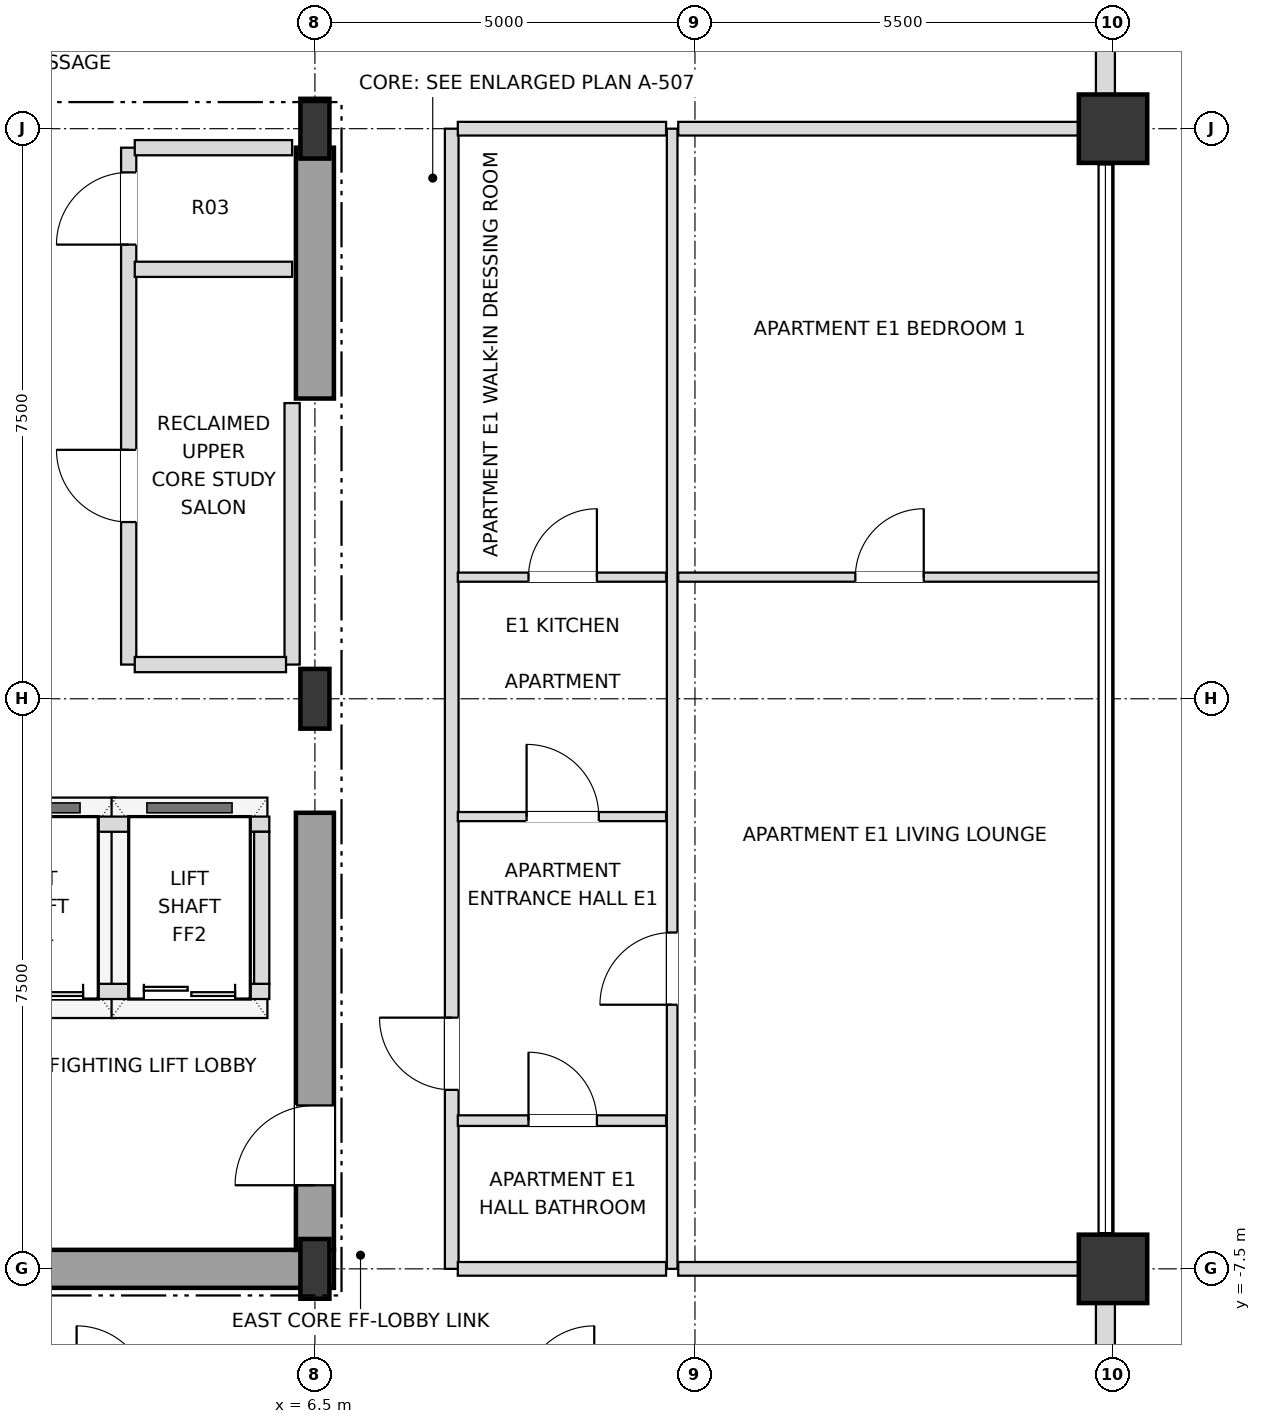
"""IFC4 building model, lengths in metres.
Left out: names, types, materials, properties, quantities, classifications, styles, units other than length and angle.
Written with IfcOpenShell. Run it as: python <this file> out.ifc"""

import sys

from ifc_helpers import new_model, si_unit, direction, frame, frame_2d, origin, origin_2d, place, context, subcontext, project, spatial, rectangle, i_section, extrude, element, fill, save


model = new_model("IFC4")
c1 = context("Model", 3, precision=1e-05, world=origin(), true_north=direction((0.0, 1.0)))
c2 = subcontext(c1, "Body", "Model", "MODEL_VIEW")
j1 = project(units=[si_unit("LENGTHUNIT", "METRE"), si_unit("PLANEANGLEUNIT", "RADIAN")], contexts=[c1])
p1 = place(None, origin())
s1 = spatial("IfcSite", under=j1, at=p1, CompositionType="ELEMENT")
p2 = place(p1, origin())
s2 = spatial("IfcBuilding", under=s1, at=p2, CompositionType="ELEMENT")
p3 = place(p2, frame((0.0, 0.0, 247.5)))
s3 = spatial("IfcBuildingStorey", under=s2, at=p3, CompositionType="ELEMENT", Elevation=247.5)
for number, where, z_axis, x_axis in (
    (1, (6.5, -7.5, 0.0), (0.0, 0.0, 1.0), (1.0, 0.0, 0.0)),
    (2, (6.5, 0.0, 0.0), (0.0, 0.0, 1.0), (1.0, 0.0, 0.0)),
    (3, (6.5, 7.5, 0.0), (0.0, 0.0, 1.0), (1.0, 0.0, 0.0)),
):
    element("IfcColumn", number, at=place(p3, frame(where, z_axis=z_axis, x_axis=x_axis)), inside=s3, PredefinedType="COLUMN", context=c2, shape_type="SweptSolid", body=[
        extrude(i_section(OverallWidth=0.382, OverallDepth=0.786, WebThickness=0.02, FlangeThickness=0.033, at=origin_2d()), origin(), (0.0, 0.0, 1.0), 3.6),
    ])
for number, where, z_axis, x_axis in (
    (4, (17.0, -7.5, 0.0), (0.0, 0.0, 1.0), (1.0, 0.0, 0.0)),
    (5, (17.0, 7.5, 0.0), (0.0, 0.0, 1.0), (1.0, 0.0, 0.0)),
):
    element("IfcColumn", number, at=place(p3, frame(where, z_axis=z_axis, x_axis=x_axis)), inside=s3, PredefinedType="USERDEFINED", context=c2, shape_type="SweptSolid", body=[
        extrude(rectangle(XDim=0.9, YDim=0.9, at=origin_2d()), origin(), (0.0, 0.0, 1.0), 3.6),
    ])
p4 = place(p3, frame((16.9, -12.555, 0.0), z_axis=(0.0, 0.0, 1.0), x_axis=(0.0, 1.0, 0.0)))
e6 = element("IfcWall", 6, at=p4, inside=s3, PredefinedType="SOLIDWALL", context=c2, shape_type="SweptSolid", body=[
    extrude(rectangle(XDim=4.61, YDim=0.25, at=frame_2d((2.305, 0.0))), origin(), (0.0, 0.0, 1.0), 2.748),
])
p5 = place(p4, frame((1.405, 0.0, 0.72)))
e7 = element("IfcOpeningElement", 7, at=p5, cuts=e6, PredefinedType="OPENING", context=c2, shape_type="SweptSolid", body=[
    extrude(rectangle(XDim=1.8, YDim=1.68, at=frame_2d((0.9, 0.84))), frame((0.0, 0.135, 0.0), z_axis=(0.0, -1.0, 0.0), x_axis=(1.0, 0.0, 0.0)), (0.0, 0.0, 1.0), 0.27),
])
p6 = place(p3, frame((16.9, 7.945, 0.0), z_axis=(0.0, 0.0, 1.0), x_axis=(0.0, 1.0, 0.0)))
e8 = element("IfcWall", 8, at=p6, inside=s3, PredefinedType="SOLIDWALL", context=c2, shape_type="SweptSolid", body=[
    extrude(rectangle(XDim=4.61, YDim=0.25, at=frame_2d((2.305, 0.0))), origin(), (0.0, 0.0, 1.0), 2.748),
])
p7 = place(p6, frame((1.405, 0.0, 0.72)))
e9 = element("IfcOpeningElement", 9, at=p7, cuts=e8, PredefinedType="OPENING", context=c2, shape_type="SweptSolid", body=[
    extrude(rectangle(XDim=1.8, YDim=1.68, at=frame_2d((0.9, 0.84))), frame((0.0, 0.135, 0.0), z_axis=(0.0, -1.0, 0.0), x_axis=(1.0, 0.0, 0.0)), (0.0, 0.0, 1.0), 0.27),
])
p8 = place(p3, frame((0.0, -7.5, 0.0), z_axis=(0.0, 0.0, 1.0), x_axis=(1.0, 0.0, 0.0)))
e10 = element("IfcWall", 10, at=p8, inside=s3, PredefinedType="SHEAR", context=c2, shape_type="SweptSolid", body=[
    extrude(rectangle(XDim=6.75, YDim=0.5, at=frame_2d((3.375, 0.0))), origin(), (0.0, 0.0, 1.0), 3.38),
])
p9 = place(p3, frame((6.5, -7.25, 0.0), z_axis=(0.0, 0.0, 1.0), x_axis=(0.0, 1.0, 0.0)))
e11 = element("IfcWall", 11, at=p9, inside=s3, PredefinedType="SHEAR", context=c2, shape_type="SweptSolid", body=[
    extrude(rectangle(XDim=5.75, YDim=0.5, at=frame_2d((2.875, 0.0))), origin(), (0.0, 0.0, 1.0), 3.38),
])
p10 = place(p9, frame((0.85, 0.0, 0.0)))
e12 = element("IfcOpeningElement", 12, at=p10, cuts=e11, PredefinedType="OPENING", context=c2, shape_type="SweptSolid", body=[
    extrude(rectangle(XDim=1.05, YDim=2.15, at=frame_2d((0.525, 1.075))), frame((0.0, 0.26, 0.0), z_axis=(0.0, -1.0, 0.0), x_axis=(1.0, 0.0, 0.0)), (0.0, 0.0, 1.0), 0.52),
])
p11 = place(p3, frame((6.5, 3.95, 0.0), z_axis=(0.0, 0.0, 1.0), x_axis=(0.0, 1.0, 0.0)))
e13 = element("IfcWall", 13, at=p11, inside=s3, PredefinedType="SHEAR", context=c2, shape_type="SweptSolid", body=[
    extrude(rectangle(XDim=3.3, YDim=0.5, at=frame_2d((1.65, 0.0))), origin(), (0.0, 0.0, 1.0), 3.38),
])
p12 = place(p3, frame((1.8, -3.85, 0.0), z_axis=(0.0, 0.0, 1.0), x_axis=(1.0, 0.0, 0.0)))
e14 = element("IfcWall", 14, at=p12, inside=s3, PredefinedType="SOLIDWALL", context=c2, shape_type="SweptSolid", body=[
    extrude(rectangle(XDim=4.1, YDim=0.2, at=frame_2d((2.05, 0.0))), origin(), (0.0, 0.0, 1.0), 3.38),
])
p13 = place(p12, frame((0.45, 0.0, 0.0)))
e15 = element("IfcOpeningElement", 15, at=p13, cuts=e14, PredefinedType="OPENING", context=c2, shape_type="SweptSolid", body=[
    extrude(rectangle(XDim=1.2, YDim=2.2, at=frame_2d((0.6, 1.1))), frame((0.0, 0.11, 0.0), z_axis=(0.0, -1.0, 0.0), x_axis=(1.0, 0.0, 0.0)), (0.0, 0.0, 1.0), 0.22),
])
p14 = place(p12, frame((2.45, 0.0, 0.0)))
e16 = element("IfcOpeningElement", 16, at=p14, cuts=e14, PredefinedType="OPENING", context=c2, shape_type="SweptSolid", body=[
    extrude(rectangle(XDim=1.2, YDim=2.2, at=frame_2d((0.6, 1.1))), frame((0.0, 0.11, 0.0), z_axis=(0.0, -1.0, 0.0), x_axis=(1.0, 0.0, 0.0)), (0.0, 0.0, 1.0), 0.22),
])
p15 = place(p3, frame((1.8, -1.65, 0.0), z_axis=(0.0, 0.0, 1.0), x_axis=(1.0, 0.0, 0.0)))
e17 = element("IfcWall", 17, at=p15, inside=s3, PredefinedType="SOLIDWALL", context=c2, shape_type="SweptSolid", body=[
    extrude(rectangle(XDim=4.1, YDim=0.2, at=frame_2d((2.05, 0.0))), origin(), (0.0, 0.0, 1.0), 3.38),
])
p16 = place(p3, frame((5.8, -3.75, 0.0), z_axis=(0.0, 0.0, 1.0), x_axis=(0.0, 1.0, 0.0)))
e18 = element("IfcWall", 18, at=p16, inside=s3, PredefinedType="SOLIDWALL", context=c2, shape_type="SweptSolid", body=[
    extrude(rectangle(XDim=2.0, YDim=0.2, at=frame_2d((1.0, 0.0))), origin(), (0.0, 0.0, 1.0), 3.38),
])
p17 = place(p3, frame((4.05, 0.45, 0.0), z_axis=(0.0, 0.0, 1.0), x_axis=(0.0, 1.0, 0.0)))
e19 = element("IfcWall", 19, at=p17, inside=s3, PredefinedType="SOLIDWALL", context=c2, shape_type="SweptSolid", body=[
    extrude(rectangle(XDim=6.8, YDim=0.2, at=frame_2d((3.4, 0.0))), origin(), (0.0, 0.0, 1.0), 3.38),
])
p18 = place(p17, frame((1.875, 0.0, 0.0)))
e20 = element("IfcOpeningElement", 20, at=p18, cuts=e19, PredefinedType="OPENING", context=c2, shape_type="SweptSolid", body=[
    extrude(rectangle(XDim=0.95, YDim=2.15, at=frame_2d((0.475, 1.075))), frame((0.0, 0.11, 0.0), z_axis=(0.0, -1.0, 0.0), x_axis=(1.0, 0.0, 0.0)), (0.0, 0.0, 1.0), 0.22),
])
p19 = place(p17, frame((5.525, 0.0, 0.0)))
e21 = element("IfcOpeningElement", 21, at=p19, cuts=e19, PredefinedType="OPENING", context=c2, shape_type="SweptSolid", body=[
    extrude(rectangle(XDim=0.95, YDim=2.15, at=frame_2d((0.475, 1.075))), frame((0.0, 0.11, 0.0), z_axis=(0.0, -1.0, 0.0), x_axis=(1.0, 0.0, 0.0)), (0.0, 0.0, 1.0), 0.22),
])
p20 = place(p3, frame((6.2, 0.45, 0.0), z_axis=(0.0, 0.0, 1.0), x_axis=(0.0, 1.0, 0.0)))
e22 = element("IfcWall", 22, at=p20, inside=s3, PredefinedType="SOLIDWALL", context=c2, shape_type="SweptSolid", body=[
    extrude(rectangle(XDim=3.44, YDim=0.2, at=frame_2d((1.72, 0.0))), origin(), (0.0, 0.0, 1.0), 3.38),
])
p21 = place(p3, frame((8.3, -7.5, 0.0), z_axis=(0.0, 0.0, 1.0), x_axis=(0.0, 1.0, 0.0)))
e23 = element("IfcWall", 23, at=p21, inside=s3, PredefinedType="PARTITIONING", context=c2, shape_type="SweptSolid", body=[
    extrude(rectangle(XDim=15.0, YDim=0.18, at=frame_2d((7.5, 0.0))), origin(), (0.0, 0.0, 1.0), 3.38),
])
p22 = place(p21, frame((2.355, 0.0, 0.0)))
e24 = element("IfcOpeningElement", 24, at=p22, cuts=e23, PredefinedType="OPENING", context=c2, shape_type="SweptSolid", body=[
    extrude(rectangle(XDim=0.95, YDim=2.15, at=frame_2d((0.475, 1.075))), frame((0.0, 0.1, 0.0), z_axis=(0.0, -1.0, 0.0), x_axis=(1.0, 0.0, 0.0)), (0.0, 0.0, 1.0), 0.2),
])
p23 = place(p3, frame((11.2, -7.5, 0.0), z_axis=(0.0, 0.0, 1.0), x_axis=(0.0, 1.0, 0.0)))
e25 = element("IfcWall", 25, at=p23, inside=s3, PredefinedType="PARTITIONING", context=c2, shape_type="SweptSolid", body=[
    extrude(rectangle(XDim=15.0, YDim=0.14, at=frame_2d((7.5, 0.0))), origin(), (0.0, 0.0, 1.0), 3.38),
])
p24 = place(p23, frame((3.475, 0.0, 0.0)))
e26 = element("IfcOpeningElement", 26, at=p24, cuts=e25, PredefinedType="OPENING", context=c2, shape_type="SweptSolid", body=[
    extrude(rectangle(XDim=0.95, YDim=2.1, at=frame_2d((0.475, 1.05))), frame((0.0, 0.08, 0.0), z_axis=(0.0, -1.0, 0.0), x_axis=(1.0, 0.0, 0.0)), (0.0, 0.0, 1.0), 0.16),
])
p25 = place(p3, frame((8.38, -7.5, 0.0), z_axis=(0.0, 0.0, 1.0), x_axis=(1.0, 0.0, 0.0)))
e27 = element("IfcWall", 27, at=p25, inside=s3, PredefinedType="PARTITIONING", context=c2, shape_type="SweptSolid", body=[
    extrude(rectangle(XDim=2.74, YDim=0.18, at=frame_2d((1.37, 0.0))), origin(), (0.0, 0.0, 1.0), 2.826),
])
p26 = place(p3, frame((11.28, -7.5, 0.0), z_axis=(0.0, 0.0, 1.0), x_axis=(1.0, 0.0, 0.0)))
e28 = element("IfcWall", 28, at=p26, inside=s3, PredefinedType="PARTITIONING", context=c2, shape_type="SweptSolid", body=[
    extrude(rectangle(XDim=5.62, YDim=0.18, at=frame_2d((2.81, 0.0))), origin(), (0.0, 0.0, 1.0), 2.826),
])
p27 = place(p3, frame((8.38, -5.55, 0.0), z_axis=(0.0, 0.0, 1.0), x_axis=(1.0, 0.0, 0.0)))
e29 = element("IfcWall", 29, at=p27, inside=s3, PredefinedType="PARTITIONING", context=c2, shape_type="SweptSolid", body=[
    extrude(rectangle(XDim=2.74, YDim=0.14, at=frame_2d((1.37, 0.0))), origin(), (0.0, 0.0, 1.0), 3.38),
])
p28 = place(p27, frame((0.93, 0.0, 0.0)))
e30 = element("IfcOpeningElement", 30, at=p28, cuts=e29, PredefinedType="OPENING", context=c2, shape_type="SweptSolid", body=[
    extrude(rectangle(XDim=0.9, YDim=2.1, at=frame_2d((0.45, 1.05))), frame((0.0, 0.08, 0.0), z_axis=(0.0, -1.0, 0.0), x_axis=(1.0, 0.0, 0.0)), (0.0, 0.0, 1.0), 0.16),
])
p29 = place(p3, frame((8.38, -1.55, 0.0), z_axis=(0.0, 0.0, 1.0), x_axis=(1.0, 0.0, 0.0)))
e31 = element("IfcWall", 31, at=p29, inside=s3, PredefinedType="PARTITIONING", context=c2, shape_type="SweptSolid", body=[
    extrude(rectangle(XDim=2.74, YDim=0.12, at=frame_2d((1.37, 0.0))), origin(), (0.0, 0.0, 1.0), 3.38),
])
p30 = place(p29, frame((0.905, 0.0, 0.0)))
e32 = element("IfcOpeningElement", 32, at=p30, cuts=e31, PredefinedType="OPENING", context=c2, shape_type="SweptSolid", body=[
    extrude(rectangle(XDim=0.95, YDim=2.1, at=frame_2d((0.475, 1.05))), frame((0.0, 0.07, 0.0), z_axis=(0.0, -1.0, 0.0), x_axis=(1.0, 0.0, 0.0)), (0.0, 0.0, 1.0), 0.14),
])
p31 = place(p3, frame((4.13, 0.45, 0.0), z_axis=(0.0, 0.0, 1.0), x_axis=(1.0, 0.0, 0.0)))
e33 = element("IfcWall", 33, at=p31, inside=s3, PredefinedType="SOLIDWALL", context=c2, shape_type="SweptSolid", body=[
    extrude(rectangle(XDim=1.99, YDim=0.2, at=frame_2d((0.995, 0.0))), origin(), (0.0, 0.0, 1.0), 3.38),
])
p32 = place(p3, frame((8.38, 1.6, 0.0), z_axis=(0.0, 0.0, 1.0), x_axis=(1.0, 0.0, 0.0)))
e34 = element("IfcWall", 34, at=p32, inside=s3, PredefinedType="PARTITIONING", context=c2, shape_type="SweptSolid", body=[
    extrude(rectangle(XDim=2.74, YDim=0.12, at=frame_2d((1.37, 0.0))), origin(), (0.0, 0.0, 1.0), 3.38),
])
p33 = place(p32, frame((0.93, 0.0, 0.0)))
e35 = element("IfcOpeningElement", 35, at=p33, cuts=e34, PredefinedType="OPENING", context=c2, shape_type="SweptSolid", body=[
    extrude(rectangle(XDim=0.9, YDim=2.1, at=frame_2d((0.45, 1.05))), frame((0.0, 0.07, 0.0), z_axis=(0.0, -1.0, 0.0), x_axis=(1.0, 0.0, 0.0)), (0.0, 0.0, 1.0), 0.14),
])
p34 = place(p3, frame((11.28, 1.6, 0.0), z_axis=(0.0, 0.0, 1.0), x_axis=(1.0, 0.0, 0.0)))
e36 = element("IfcWall", 36, at=p34, inside=s3, PredefinedType="PARTITIONING", context=c2, shape_type="SweptSolid", body=[
    extrude(rectangle(XDim=5.54, YDim=0.12, at=frame_2d((2.77, 0.0))), origin(), (0.0, 0.0, 1.0), 3.018),
])
p35 = place(p34, frame((2.33, 0.0, 0.0)))
e37 = element("IfcOpeningElement", 37, at=p35, cuts=e36, PredefinedType="OPENING", context=c2, shape_type="SweptSolid", body=[
    extrude(rectangle(XDim=0.9, YDim=2.1, at=frame_2d((0.45, 1.05))), frame((0.0, 0.07, 0.0), z_axis=(0.0, -1.0, 0.0), x_axis=(1.0, 0.0, 0.0)), (0.0, 0.0, 1.0), 0.14),
])
for number, where, z_axis, x_axis in (
    (38, (4.13, 5.65, 0.0), (0.0, 0.0, 1.0), (1.0, 0.0, 0.0)),
    (39, (4.13, 7.25, 0.0), (0.0, 0.0, 1.0), (1.0, 0.0, 0.0)),
):
    element("IfcWall", number, at=place(p3, frame(where, z_axis=z_axis, x_axis=x_axis)), inside=s3, PredefinedType="SOLIDWALL", context=c2, shape_type="SweptSolid", body=[
        extrude(rectangle(XDim=2.07, YDim=0.2, at=frame_2d((1.035, 0.0))), origin(), (0.0, 0.0, 1.0), 3.38),
    ])
p36 = place(p3, frame((8.38, 7.5, 0.0), z_axis=(0.0, 0.0, 1.0), x_axis=(1.0, 0.0, 0.0)))
e40 = element("IfcWall", 40, at=p36, inside=s3, PredefinedType="PARTITIONING", context=c2, shape_type="SweptSolid", body=[
    extrude(rectangle(XDim=2.74, YDim=0.18, at=frame_2d((1.37, 0.0))), origin(), (0.0, 0.0, 1.0), 2.826),
])
p37 = place(p3, frame((11.28, 7.5, 0.0), z_axis=(0.0, 0.0, 1.0), x_axis=(1.0, 0.0, 0.0)))
e41 = element("IfcWall", 41, at=p37, inside=s3, PredefinedType="PARTITIONING", context=c2, shape_type="SweptSolid", body=[
    extrude(rectangle(XDim=5.62, YDim=0.18, at=frame_2d((2.81, 0.0))), origin(), (0.0, 0.0, 1.0), 2.826),
])
p38 = place(p10, origin())
e42 = element("IfcDoor", 42, at=p38, inside=s3, OperationType="SINGLE_SWING_LEFT", PredefinedType="DOOR", context=c2, shape_type="SweptSolid", body=[
    extrude(rectangle(XDim=1.05, YDim=2.15, at=frame_2d((0.525, 1.075))), frame((0.0, 0.025, 0.0), z_axis=(0.0, -1.0, 0.0), x_axis=(1.0, 0.0, 0.0)), (0.0, 0.0, 1.0), 0.05),
])
fill(e12, e42)
p39 = place(p13, origin())
e43 = element("IfcDoor", 43, at=p39, inside=s3, OperationType="DOUBLE_DOOR_SLIDING", PredefinedType="DOOR", context=c2, shape_type="SweptSolid", body=[
    extrude(rectangle(XDim=1.2, YDim=2.2, at=frame_2d((0.6, 1.1))), frame((0.0, 0.025, 0.0), z_axis=(0.0, -1.0, 0.0), x_axis=(1.0, 0.0, 0.0)), (0.0, 0.0, 1.0), 0.05),
])
fill(e15, e43)
p40 = place(p14, origin())
e44 = element("IfcDoor", 44, at=p40, inside=s3, OperationType="DOUBLE_DOOR_SLIDING", PredefinedType="DOOR", context=c2, shape_type="SweptSolid", body=[
    extrude(rectangle(XDim=1.2, YDim=2.2, at=frame_2d((0.6, 1.1))), frame((0.0, 0.025, 0.0), z_axis=(0.0, -1.0, 0.0), x_axis=(1.0, 0.0, 0.0)), (0.0, 0.0, 1.0), 0.05),
])
fill(e16, e44)
p41 = place(p18, origin())
e45 = element("IfcDoor", 45, at=p41, inside=s3, OperationType="SINGLE_SWING_RIGHT", PredefinedType="DOOR", context=c2, shape_type="SweptSolid", body=[
    extrude(rectangle(XDim=0.95, YDim=2.15, at=frame_2d((0.475, 1.075))), frame((0.0, 0.025, 0.0), z_axis=(0.0, -1.0, 0.0), x_axis=(1.0, 0.0, 0.0)), (0.0, 0.0, 1.0), 0.05),
])
fill(e20, e45)
p42 = place(p19, origin())
e46 = element("IfcDoor", 46, at=p42, inside=s3, OperationType="SINGLE_SWING_LEFT", PredefinedType="DOOR", context=c2, shape_type="SweptSolid", body=[
    extrude(rectangle(XDim=0.95, YDim=2.15, at=frame_2d((0.475, 1.075))), frame((0.0, 0.025, 0.0), z_axis=(0.0, -1.0, 0.0), x_axis=(1.0, 0.0, 0.0)), (0.0, 0.0, 1.0), 0.05),
])
fill(e21, e46)
p43 = place(p28, origin())
e47 = element("IfcDoor", 47, at=p43, inside=s3, OperationType="SINGLE_SWING_LEFT", PredefinedType="DOOR", context=c2, shape_type="SweptSolid", body=[
    extrude(rectangle(XDim=0.9, YDim=2.1, at=frame_2d((0.45, 1.05))), frame((0.0, 0.025, 0.0), z_axis=(0.0, -1.0, 0.0), x_axis=(1.0, 0.0, 0.0)), (0.0, 0.0, 1.0), 0.05),
])
fill(e30, e47)
p44 = place(p22, origin())
e48 = element("IfcDoor", 48, at=p44, inside=s3, OperationType="SINGLE_SWING_RIGHT", PredefinedType="DOOR", context=c2, shape_type="SweptSolid", body=[
    extrude(rectangle(XDim=0.95, YDim=2.15, at=frame_2d((0.475, 1.075))), frame((0.0, 0.025, 0.0), z_axis=(0.0, -1.0, 0.0), x_axis=(1.0, 0.0, 0.0)), (0.0, 0.0, 1.0), 0.05),
])
fill(e24, e48)
p45 = place(p30, origin())
e49 = element("IfcDoor", 49, at=p45, inside=s3, OperationType="SINGLE_SWING_LEFT", PredefinedType="DOOR", context=c2, shape_type="SweptSolid", body=[
    extrude(rectangle(XDim=0.95, YDim=2.1, at=frame_2d((0.475, 1.05))), frame((0.0, 0.025, 0.0), z_axis=(0.0, -1.0, 0.0), x_axis=(1.0, 0.0, 0.0)), (0.0, 0.0, 1.0), 0.05),
])
fill(e32, e49)
p46 = place(p33, origin())
e50 = element("IfcDoor", 50, at=p46, inside=s3, OperationType="SINGLE_SWING_RIGHT", PredefinedType="DOOR", context=c2, shape_type="SweptSolid", body=[
    extrude(rectangle(XDim=0.9, YDim=2.1, at=frame_2d((0.45, 1.05))), frame((0.0, 0.025, 0.0), z_axis=(0.0, -1.0, 0.0), x_axis=(1.0, 0.0, 0.0)), (0.0, 0.0, 1.0), 0.05),
])
fill(e35, e50)
p47 = place(p24, origin())
e51 = element("IfcDoor", 51, at=p47, inside=s3, OperationType="SINGLE_SWING_LEFT", PredefinedType="DOOR", context=c2, shape_type="SweptSolid", body=[
    extrude(rectangle(XDim=0.95, YDim=2.1, at=frame_2d((0.475, 1.05))), frame((0.0, 0.025, 0.0), z_axis=(0.0, -1.0, 0.0), x_axis=(1.0, 0.0, 0.0)), (0.0, 0.0, 1.0), 0.05),
])
fill(e26, e51)
p48 = place(p35, origin())
e52 = element("IfcDoor", 52, at=p48, inside=s3, OperationType="SINGLE_SWING_RIGHT", PredefinedType="DOOR", context=c2, shape_type="SweptSolid", body=[
    extrude(rectangle(XDim=0.9, YDim=2.1, at=frame_2d((0.45, 1.05))), frame((0.0, 0.025, 0.0), z_axis=(0.0, -1.0, 0.0), x_axis=(1.0, 0.0, 0.0)), (0.0, 0.0, 1.0), 0.05),
])
fill(e37, e52)
save(model, sys.argv[1])
